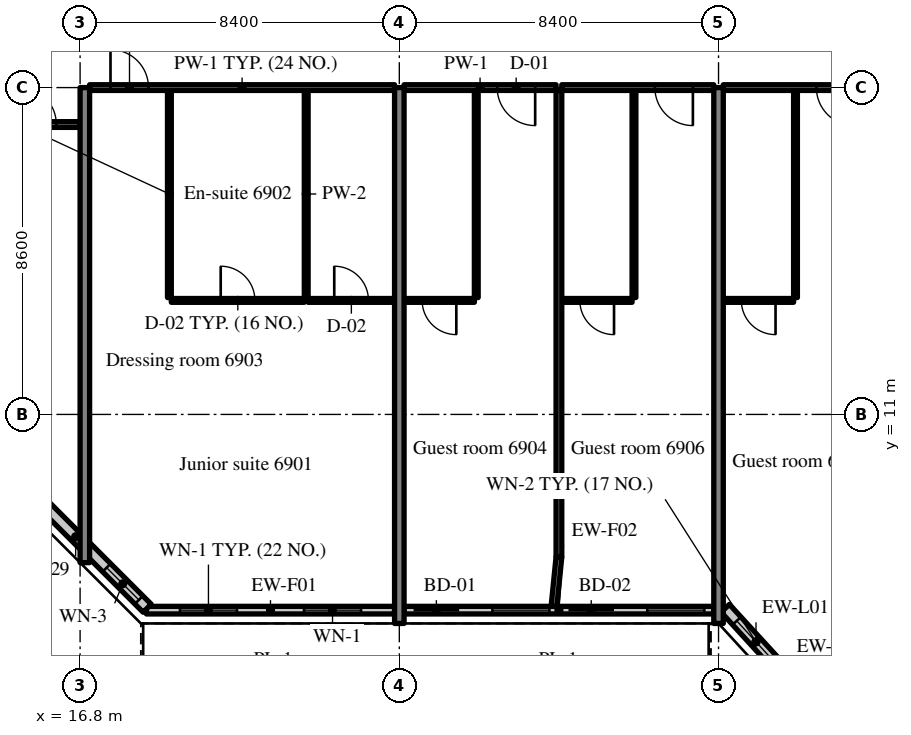
"""IFC4 building model, lengths in metres.
Left out: names, types, materials, properties, quantities, classifications, styles, units other than length and angle.
Written with IfcOpenShell. Run it as: python <this file> out.ifc"""

import sys

from ifc_helpers import new_model, si_unit, direction, frame, frame_2d, origin, place, context, subcontext, project, spatial, rectangle, extrude, source, transform, mapped, element, fill, save


model = new_model("IFC4")
c1 = context("Model", 3, precision=1e-05, world=origin(), true_north=direction((0.0, 1.0)))
c2 = subcontext(c1, "Body", "Model", "MODEL_VIEW")
j1 = project(units=[si_unit("LENGTHUNIT", "METRE"), si_unit("PLANEANGLEUNIT", "RADIAN")], contexts=[c1])
p1 = place(None, origin())
s1 = spatial("IfcSite", under=j1, at=p1, CompositionType="ELEMENT")
p2 = place(p1, origin())
s2 = spatial("IfcBuilding", under=s1, at=p2, CompositionType="ELEMENT")
p3 = place(p2, frame((0.0, 0.0, 289.7)))
s3 = spatial("IfcBuildingStorey", under=s2, at=p3, CompositionType="ELEMENT", Elevation=289.7)
m1 = source(origin(), c2, "Body", "SweptSolid", [
    extrude(rectangle(XDim=12.5, YDim=0.25, at=frame_2d((6.25, 0.0))), origin(), (0.0, 0.0, 1.0), 3.72),
])
p4 = place(p3, frame((16.925, 7.1, 0.0), z_axis=(0.0, 0.0, 1.0), x_axis=(0.0, 1.0, 0.0)))
e1 = element("IfcWall", 1, at=p4, inside=s3, PredefinedType="SHEAR", context=c2, shape_type="MappedRepresentation", body=[
    mapped(m1, transform((0.0, 0.0, 0.0), scale=1.0)),
])
m2 = source(origin(), c2, "Body", "SweptSolid", [
    extrude(rectangle(XDim=14.1, YDim=0.25, at=frame_2d((7.05, 0.0))), origin(), (0.0, 0.0, 1.0), 3.72),
])
for number, where, z_axis, x_axis in (
    (2, (25.2, 5.5, 0.0), (0.0, 0.0, 1.0), (0.0, 1.0, 0.0)),
    (3, (33.6, 5.5, 0.0), (0.0, 0.0, 1.0), (0.0, 1.0, 0.0)),
):
    element("IfcWall", number, at=place(p3, frame(where, z_axis=z_axis, x_axis=x_axis)), inside=s3, PredefinedType="SHEAR", context=c2, shape_type="MappedRepresentation", body=[
        mapped(m2, transform((0.0, 0.0, 0.0), scale=1.0)),
    ])
m3 = source(origin(), c2, "Body", "SweptSolid", [
    extrude(rectangle(XDim=6.53, YDim=0.2, at=frame_2d((3.265, 0.0))), origin(), (0.0, 0.0, 1.0), 3.17),
])
p5 = place(p3, frame((18.545, 5.85, 0.0), z_axis=(0.0, 0.0, 1.0), x_axis=(1.0, 0.0, 0.0)))
e4 = element("IfcWall", 4, at=p5, inside=s3, PredefinedType="SOLIDWALL", context=c2, shape_type="MappedRepresentation", body=[
    mapped(m3, transform((0.0, 0.0, 0.0), scale=1.0)),
])
m4 = source(origin(), c2, "Body", "SweptSolid", [
    extrude(rectangle(XDim=1.5, YDim=1.5, at=frame_2d((0.75, 0.75))), frame((0.0, 0.11, 0.0), z_axis=(0.0, -1.0, 0.0), x_axis=(1.0, 0.0, 0.0)), (0.0, 0.0, 1.0), 0.22),
])
p6 = place(p5, frame((0.883, 0.0, 0.9)))
e5 = element("IfcOpeningElement", 5, at=p6, cuts=e4, PredefinedType="OPENING", context=c2, shape_type="MappedRepresentation", body=[
    mapped(m4, transform((0.0, 0.0, 0.0), scale=1.0)),
])
p7 = place(p5, frame((4.147, 0.0, 0.9)))
e6 = element("IfcOpeningElement", 6, at=p7, cuts=e4, PredefinedType="OPENING", context=c2, shape_type="MappedRepresentation", body=[
    mapped(m4, transform((0.0, 0.0, 0.0), scale=1.0)),
])
m5 = source(origin(), c2, "Body", "SweptSolid", [
    extrude(rectangle(XDim=8.15, YDim=0.2, at=frame_2d((4.075, 0.0))), origin(), (0.0, 0.0, 1.0), 3.17),
])
p8 = place(p3, frame((25.325, 5.85, 0.0), z_axis=(0.0, 0.0, 1.0), x_axis=(1.0, 0.0, 0.0)))
e7 = element("IfcWall", 7, at=p8, inside=s3, PredefinedType="SOLIDWALL", context=c2, shape_type="MappedRepresentation", body=[
    mapped(m5, transform((0.0, 0.0, 0.0), scale=1.0)),
])
m6 = source(origin(), c2, "Body", "SweptSolid", [
    extrude(rectangle(XDim=1.2, YDim=2.4, at=frame_2d((0.6, 1.2))), frame((0.0, 0.11, 0.0), z_axis=(0.0, -1.0, 0.0), x_axis=(1.0, 0.0, 0.0)), (0.0, 0.0, 1.0), 0.22),
])
p9 = place(p8, frame((0.25, 0.0, 0.0)))
e8 = element("IfcOpeningElement", 8, at=p9, cuts=e7, PredefinedType="OPENING", context=c2, shape_type="MappedRepresentation", body=[
    mapped(m6, transform((0.0, 0.0, 0.0), scale=1.0)),
])
p10 = place(p8, frame((2.325, 0.0, 0.9)))
e9 = element("IfcOpeningElement", 9, at=p10, cuts=e7, PredefinedType="OPENING", context=c2, shape_type="MappedRepresentation", body=[
    mapped(m4, transform((0.0, 0.0, 0.0), scale=1.0)),
])
p11 = place(p8, frame((4.325, 0.0, 0.0)))
e10 = element("IfcOpeningElement", 10, at=p11, cuts=e7, PredefinedType="OPENING", context=c2, shape_type="MappedRepresentation", body=[
    mapped(m6, transform((0.0, 0.0, 0.0), scale=1.0)),
])
p12 = place(p8, frame((6.4, 0.0, 0.9)))
e11 = element("IfcOpeningElement", 11, at=p12, cuts=e7, PredefinedType="OPENING", context=c2, shape_type="MappedRepresentation", body=[
    mapped(m4, transform((0.0, 0.0, 0.0), scale=1.0)),
])
m7 = source(origin(), c2, "Body", "SweptSolid", [
    extrude(rectangle(XDim=2.398, YDim=0.3, at=frame_2d((1.199, 0.0))), origin(), (0.0, 0.0, 1.0), 3.72),
])
p13 = place(p3, frame((33.776, 5.9, 0.0), z_axis=(0.0, 0.0, 1.0), x_axis=(0.675374189419, -0.737475222815, 0.0)))
e12 = element("IfcWall", 12, at=p13, inside=s3, PredefinedType="SOLIDWALL", context=c2, shape_type="MappedRepresentation", body=[
    mapped(m7, transform((0.0, 0.0, 0.0), scale=1.0)),
])
m8 = source(origin(), c2, "Body", "SweptSolid", [
    extrude(rectangle(XDim=1.5, YDim=2.0, at=frame_2d((0.75, 1.0))), frame((0.0, 0.16, 0.0), z_axis=(0.0, -1.0, 0.0), x_axis=(1.0, 0.0, 0.0)), (0.0, 0.0, 1.0), 0.32),
])
p14 = place(p13, frame((0.449, 0.0, 0.9)))
e13 = element("IfcOpeningElement", 13, at=p14, cuts=e12, PredefinedType="OPENING", context=c2, shape_type="MappedRepresentation", body=[
    mapped(m8, transform((0.0, 0.0, 0.0), scale=1.0)),
])
m9 = source(origin(), c2, "Body", "SweptSolid", [
    extrude(rectangle(XDim=5.326, YDim=0.3, at=frame_2d((2.663, 0.0))), origin(), (0.0, 0.0, 1.0), 3.72),
])
p15 = place(p3, frame((14.8, 9.666, 0.0), z_axis=(0.0, 0.0, 1.0), x_axis=(0.707083859269, -0.707129702361, 0.0)))
e14 = element("IfcWall", 14, at=p15, inside=s3, PredefinedType="SOLIDWALL", context=c2, shape_type="MappedRepresentation", body=[
    mapped(m9, transform((0.0, 0.0, 0.0), scale=1.0)),
])
m10 = source(origin(), c2, "Body", "SweptSolid", [
    extrude(rectangle(XDim=1.2, YDim=1.5, at=frame_2d((0.6, 0.75))), frame((0.0, 0.16, 0.0), z_axis=(0.0, -1.0, 0.0), x_axis=(1.0, 0.0, 0.0)), (0.0, 0.0, 1.0), 0.32),
])
p16 = place(p15, frame((3.815, 0.0, 0.9)))
e15 = element("IfcOpeningElement", 15, at=p16, cuts=e14, PredefinedType="OPENING", context=c2, shape_type="MappedRepresentation", body=[
    mapped(m10, transform((0.0, 0.0, 0.0), scale=1.0)),
])
m11 = source(origin(), c2, "Body", "SweptSolid", [
    extrude(rectangle(XDim=5.45, YDim=0.1, at=frame_2d((2.725, 0.0))), origin(), (0.0, 0.0, 1.0), 3.72),
])
for number, where, z_axis, x_axis in (
    (16, (19.15, 14.075, 0.0), (0.0, 0.0, 1.0), (0.0, 1.0, 0.0)),
    (17, (22.75, 14.075, 0.0), (0.0, 0.0, 1.0), (0.0, 1.0, 0.0)),
):
    element("IfcWall", number, at=place(p3, frame(where, z_axis=z_axis, x_axis=x_axis)), inside=s3, PredefinedType="PARTITIONING", context=c2, shape_type="MappedRepresentation", body=[
        mapped(m11, transform((0.0, 0.0, 0.0), scale=1.0)),
    ])
m12 = source(origin(), c2, "Body", "SweptSolid", [
    extrude(rectangle(XDim=3.5, YDim=0.1, at=frame_2d((1.75, 0.0))), origin(), (0.0, 0.0, 1.0), 3.72),
])
p17 = place(p3, frame((19.2, 14.0, 0.0), z_axis=(0.0, 0.0, 1.0), x_axis=(1.0, 0.0, 0.0)))
e18 = element("IfcWall", 18, at=p17, inside=s3, PredefinedType="PARTITIONING", context=c2, shape_type="MappedRepresentation", body=[
    mapped(m12, transform((0.0, 0.0, 0.0), scale=1.0)),
])
m13 = source(origin(), c2, "Body", "SweptSolid", [
    extrude(rectangle(XDim=0.9, YDim=2.1, at=frame_2d((0.45, 1.05))), frame((0.0, 0.06, 0.0), z_axis=(0.0, -1.0, 0.0), x_axis=(1.0, 0.0, 0.0)), (0.0, 0.0, 1.0), 0.12),
])
p18 = place(p17, frame((1.3, 0.0, 0.0)))
e19 = element("IfcOpeningElement", 19, at=p18, cuts=e18, PredefinedType="OPENING", context=c2, shape_type="MappedRepresentation", body=[
    mapped(m13, transform((0.0, 0.0, 0.0), scale=1.0)),
])
m14 = source(origin(), c2, "Body", "SweptSolid", [
    extrude(rectangle(XDim=2.275, YDim=0.1, at=frame_2d((1.137, 0.0))), origin(), (0.0, 0.0, 1.0), 3.72),
])
p19 = place(p3, frame((22.8, 14.0, 0.0), z_axis=(0.0, 0.0, 1.0), x_axis=(1.0, 0.0, 0.0)))
e20 = element("IfcWall", 20, at=p19, inside=s3, PredefinedType="PARTITIONING", context=c2, shape_type="MappedRepresentation", body=[
    mapped(m14, transform((0.0, 0.0, 0.0), scale=1.0)),
])
p20 = place(p19, frame((0.688, 0.0, 0.0)))
e21 = element("IfcOpeningElement", 21, at=p20, cuts=e20, PredefinedType="OPENING", context=c2, shape_type="MappedRepresentation", body=[
    mapped(m13, transform((0.0, 0.0, 0.0), scale=1.0)),
])
m15 = source(origin(), c2, "Body", "SweptSolid", [
    extrude(rectangle(XDim=8.025, YDim=0.15, at=frame_2d((4.012, 0.0))), origin(), (0.0, 0.0, 1.0), 3.02),
])
p21 = place(p3, frame((17.05, 19.6, 0.0), z_axis=(0.0, 0.0, 1.0), x_axis=(1.0, 0.0, 0.0)))
e22 = element("IfcWall", 22, at=p21, inside=s3, PredefinedType="PARTITIONING", context=c2, shape_type="MappedRepresentation", body=[
    mapped(m15, transform((0.0, 0.0, 0.0), scale=1.0)),
])
m16 = source(origin(), c2, "Body", "SweptSolid", [
    extrude(rectangle(XDim=1.0, YDim=2.1, at=frame_2d((0.5, 1.05))), frame((0.0, 0.085, 0.0), z_axis=(0.0, -1.0, 0.0), x_axis=(1.0, 0.0, 0.0)), (0.0, 0.0, 1.0), 0.17),
])
p22 = place(p21, frame((0.55, 0.0, 0.0)))
e23 = element("IfcOpeningElement", 23, at=p22, cuts=e22, PredefinedType="OPENING", context=c2, shape_type="MappedRepresentation", body=[
    mapped(m16, transform((0.0, 0.0, 0.0), scale=1.0)),
])
p23 = place(p3, frame((27.225, 14.075, 0.0), z_axis=(0.0, 0.0, 1.0), x_axis=(0.0, 1.0, 0.0)))
e24 = element("IfcWall", 24, at=p23, inside=s3, PredefinedType="PARTITIONING", context=c2, shape_type="MappedRepresentation", body=[
    mapped(m11, transform((0.0, 0.0, 0.0), scale=1.0)),
])
m17 = source(origin(), c2, "Body", "SweptSolid", [
    extrude(rectangle(XDim=1.85, YDim=0.1, at=frame_2d((0.925, 0.0))), origin(), (0.0, 0.0, 1.0), 3.72),
])
p24 = place(p3, frame((25.325, 14.0, 0.0), z_axis=(0.0, 0.0, 1.0), x_axis=(1.0, 0.0, 0.0)))
e25 = element("IfcWall", 25, at=p24, inside=s3, PredefinedType="PARTITIONING", context=c2, shape_type="MappedRepresentation", body=[
    mapped(m17, transform((0.0, 0.0, 0.0), scale=1.0)),
])
p25 = place(p24, frame((0.475, 0.0, 0.0)))
e26 = element("IfcOpeningElement", 26, at=p25, cuts=e25, PredefinedType="OPENING", context=c2, shape_type="MappedRepresentation", body=[
    mapped(m13, transform((0.0, 0.0, 0.0), scale=1.0)),
])
m18 = source(origin(), c2, "Body", "SweptSolid", [
    extrude(rectangle(XDim=4.0, YDim=0.15, at=frame_2d((2.0, 0.0))), origin(), (0.0, 0.0, 1.0), 3.02),
])
p26 = place(p3, frame((25.325, 19.6, 0.0), z_axis=(0.0, 0.0, 1.0), x_axis=(1.0, 0.0, 0.0)))
e27 = element("IfcWall", 27, at=p26, inside=s3, PredefinedType="PARTITIONING", context=c2, shape_type="MappedRepresentation", body=[
    mapped(m18, transform((0.0, 0.0, 0.0), scale=1.0)),
])
p27 = place(p26, frame((2.45, 0.0, 0.0)))
e28 = element("IfcOpeningElement", 28, at=p27, cuts=e27, PredefinedType="OPENING", context=c2, shape_type="MappedRepresentation", body=[
    mapped(m16, transform((0.0, 0.0, 0.0), scale=1.0)),
])
p28 = place(p3, frame((31.375, 14.075, 0.0), z_axis=(0.0, 0.0, 1.0), x_axis=(0.0, 1.0, 0.0)))
e29 = element("IfcWall", 29, at=p28, inside=s3, PredefinedType="PARTITIONING", context=c2, shape_type="MappedRepresentation", body=[
    mapped(m11, transform((0.0, 0.0, 0.0), scale=1.0)),
])
m19 = source(origin(), c2, "Body", "SweptSolid", [
    extrude(rectangle(XDim=1.85, YDim=0.1, at=frame_2d((0.925, 0.0))), origin(), (0.0, 0.0, 1.0), 3.72),
])
p29 = place(p3, frame((29.475, 14.0, 0.0), z_axis=(0.0, 0.0, 1.0), x_axis=(1.0, 0.0, 0.0)))
e30 = element("IfcWall", 30, at=p29, inside=s3, PredefinedType="PARTITIONING", context=c2, shape_type="MappedRepresentation", body=[
    mapped(m19, transform((0.0, 0.0, 0.0), scale=1.0)),
])
p30 = place(p29, frame((0.475, 0.0, 0.0)))
e31 = element("IfcOpeningElement", 31, at=p30, cuts=e30, PredefinedType="OPENING", context=c2, shape_type="MappedRepresentation", body=[
    mapped(m13, transform((0.0, 0.0, 0.0), scale=1.0)),
])
p31 = place(p3, frame((29.475, 19.6, 0.0), z_axis=(0.0, 0.0, 1.0), x_axis=(1.0, 0.0, 0.0)))
e32 = element("IfcWall", 32, at=p31, inside=s3, PredefinedType="PARTITIONING", context=c2, shape_type="MappedRepresentation", body=[
    mapped(m18, transform((0.0, 0.0, 0.0), scale=1.0)),
])
p32 = place(p31, frame((2.45, 0.0, 0.0)))
e33 = element("IfcOpeningElement", 33, at=p32, cuts=e32, PredefinedType="OPENING", context=c2, shape_type="MappedRepresentation", body=[
    mapped(m16, transform((0.0, 0.0, 0.0), scale=1.0)),
])
m20 = source(origin(), c2, "Body", "SweptSolid", [
    extrude(rectangle(XDim=12.275, YDim=0.15, at=frame_2d((6.137, 0.0))), origin(), (0.0, 0.0, 1.0), 3.72),
])
p33 = place(p3, frame((29.4, 7.25, 0.0), z_axis=(0.0, 0.0, 1.0), x_axis=(0.0, 1.0, 0.0)))
e34 = element("IfcWall", 34, at=p33, inside=s3, PredefinedType="PARTITIONING", context=c2, shape_type="MappedRepresentation", body=[
    mapped(m20, transform((0.0, 0.0, 0.0), scale=1.0)),
])
p34 = place(p3, frame((35.625, 14.075, 0.0), z_axis=(0.0, 0.0, 1.0), x_axis=(0.0, 1.0, 0.0)))
e35 = element("IfcWall", 35, at=p34, inside=s3, PredefinedType="PARTITIONING", context=c2, shape_type="MappedRepresentation", body=[
    mapped(m11, transform((0.0, 0.0, 0.0), scale=1.0)),
])
p35 = place(p3, frame((33.725, 14.0, 0.0), z_axis=(0.0, 0.0, 1.0), x_axis=(1.0, 0.0, 0.0)))
e36 = element("IfcWall", 36, at=p35, inside=s3, PredefinedType="PARTITIONING", context=c2, shape_type="MappedRepresentation", body=[
    mapped(m19, transform((0.0, 0.0, 0.0), scale=1.0)),
])
p36 = place(p35, frame((0.475, 0.0, 0.0)))
e37 = element("IfcOpeningElement", 37, at=p36, cuts=e36, PredefinedType="OPENING", context=c2, shape_type="MappedRepresentation", body=[
    mapped(m13, transform((0.0, 0.0, 0.0), scale=1.0)),
])
p37 = place(p3, frame((33.725, 19.6, 0.0), z_axis=(0.0, 0.0, 1.0), x_axis=(1.0, 0.0, 0.0)))
e38 = element("IfcWall", 38, at=p37, inside=s3, PredefinedType="PARTITIONING", context=c2, shape_type="MappedRepresentation", body=[
    mapped(m18, transform((0.0, 0.0, 0.0), scale=1.0)),
])
p38 = place(p37, frame((2.45, 0.0, 0.0)))
e39 = element("IfcOpeningElement", 39, at=p38, cuts=e38, PredefinedType="OPENING", context=c2, shape_type="MappedRepresentation", body=[
    mapped(m16, transform((0.0, 0.0, 0.0), scale=1.0)),
])
m21 = source(origin(), c2, "Body", "SweptSolid", [
    extrude(rectangle(XDim=1.9, YDim=0.15, at=frame_2d((0.95, 0.0))), origin(), (0.0, 0.0, 1.0), 3.02),
])
p39 = place(p3, frame((14.9, 18.628, 0.0), z_axis=(0.0, 0.0, 1.0), x_axis=(1.0, 0.0, 0.0)))
e40 = element("IfcWall", 40, at=p39, inside=s3, PredefinedType="PARTITIONING", context=c2, shape_type="MappedRepresentation", body=[
    mapped(m21, transform((0.0, 0.0, 0.0), scale=1.0)),
])
p40 = place(p39, frame((0.275, 0.0, 0.0)))
e41 = element("IfcOpeningElement", 41, at=p40, cuts=e40, PredefinedType="OPENING", context=c2, shape_type="MappedRepresentation", body=[
    mapped(m16, transform((0.0, 0.0, 0.0), scale=1.0)),
])
m22 = source(origin(), c2, "Body", "SweptSolid", [
    extrude(rectangle(XDim=1.307, YDim=0.15, at=frame_2d((0.653, 0.0))), origin(), (0.0, 0.0, 1.0), 3.72),
])
p41 = place(p3, frame((29.27, 5.95, 0.0), z_axis=(0.0, 0.0, 1.0), x_axis=(0.099411212066, 0.995046436562, 0.0)))
e42 = element("IfcWall", 42, at=p41, inside=s3, PredefinedType="PARTITIONING", context=c2, shape_type="MappedRepresentation", body=[
    mapped(m22, transform((0.0, 0.0, 0.0), scale=1.0)),
])
m23 = source(origin(), c2, "Body", "SweptSolid", [
    extrude(rectangle(XDim=1.5, YDim=1.5, at=frame_2d((0.75, 0.75))), frame((0.0, 0.03, 0.0), z_axis=(0.0, -1.0, 0.0), x_axis=(1.0, 0.0, 0.0)), (0.0, 0.0, 1.0), 0.06),
])
p42 = place(p6, origin())
e43 = element("IfcWindow", 43, at=p42, inside=s3, PartitioningType="SINGLE_PANEL", PredefinedType="WINDOW", context=c2, shape_type="MappedRepresentation", body=[
    mapped(m23, transform((0.0, 0.0, 0.0), scale=1.0)),
])
fill(e5, e43)
p43 = place(p7, origin())
e44 = element("IfcWindow", 44, at=p43, inside=s3, PartitioningType="SINGLE_PANEL", PredefinedType="WINDOW", context=c2, shape_type="MappedRepresentation", body=[
    mapped(m23, transform((0.0, 0.0, 0.0), scale=1.0)),
])
fill(e6, e44)
m24 = source(origin(), c2, "Body", "SweptSolid", [
    extrude(rectangle(XDim=1.2, YDim=2.4, at=frame_2d((0.6, 1.2))), frame((0.0, 0.025, 0.0), z_axis=(0.0, -1.0, 0.0), x_axis=(1.0, 0.0, 0.0)), (0.0, 0.0, 1.0), 0.05),
])
p44 = place(p9, origin())
e45 = element("IfcDoor", 45, at=p44, inside=s3, OperationType="SLIDING_TO_LEFT", PredefinedType="DOOR", context=c2, shape_type="MappedRepresentation", body=[
    mapped(m24, transform((0.0, 0.0, 0.0), scale=1.0)),
])
fill(e8, e45)
p45 = place(p10, origin())
e46 = element("IfcWindow", 46, at=p45, inside=s3, PartitioningType="SINGLE_PANEL", PredefinedType="WINDOW", context=c2, shape_type="MappedRepresentation", body=[
    mapped(m23, transform((0.0, 0.0, 0.0), scale=1.0)),
])
fill(e9, e46)
p46 = place(p11, origin())
e47 = element("IfcDoor", 47, at=p46, inside=s3, OperationType="SLIDING_TO_RIGHT", PredefinedType="DOOR", context=c2, shape_type="MappedRepresentation", body=[
    mapped(m24, transform((0.0, 0.0, 0.0), scale=1.0)),
])
fill(e10, e47)
p47 = place(p12, origin())
e48 = element("IfcWindow", 48, at=p47, inside=s3, PartitioningType="SINGLE_PANEL", PredefinedType="WINDOW", context=c2, shape_type="MappedRepresentation", body=[
    mapped(m23, transform((0.0, 0.0, 0.0), scale=1.0)),
])
fill(e11, e48)
m25 = source(origin(), c2, "Body", "SweptSolid", [
    extrude(rectangle(XDim=1.5, YDim=2.0, at=frame_2d((0.75, 1.0))), frame((0.0, 0.03, 0.0), z_axis=(0.0, -1.0, 0.0), x_axis=(1.0, 0.0, 0.0)), (0.0, 0.0, 1.0), 0.06),
])
p48 = place(p14, origin())
e49 = element("IfcWindow", 49, at=p48, inside=s3, PartitioningType="SINGLE_PANEL", PredefinedType="WINDOW", context=c2, shape_type="MappedRepresentation", body=[
    mapped(m25, transform((0.0, 0.0, 0.0), scale=1.0)),
])
fill(e13, e49)
m26 = source(origin(), c2, "Body", "SweptSolid", [
    extrude(rectangle(XDim=1.2, YDim=1.5, at=frame_2d((0.6, 0.75))), frame((0.0, 0.03, 0.0), z_axis=(0.0, -1.0, 0.0), x_axis=(1.0, 0.0, 0.0)), (0.0, 0.0, 1.0), 0.06),
])
p49 = place(p16, origin())
e50 = element("IfcWindow", 50, at=p49, inside=s3, PartitioningType="SINGLE_PANEL", PredefinedType="WINDOW", context=c2, shape_type="MappedRepresentation", body=[
    mapped(m26, transform((0.0, 0.0, 0.0), scale=1.0)),
])
fill(e15, e50)
m27 = source(origin(), c2, "Body", "SweptSolid", [
    extrude(rectangle(XDim=0.9, YDim=2.1, at=frame_2d((0.45, 1.05))), frame((0.0, 0.025, 0.0), z_axis=(0.0, -1.0, 0.0), x_axis=(1.0, 0.0, 0.0)), (0.0, 0.0, 1.0), 0.05),
])
p50 = place(p18, origin())
e51 = element("IfcDoor", 51, at=p50, inside=s3, OperationType="SINGLE_SWING_LEFT", PredefinedType="DOOR", context=c2, shape_type="MappedRepresentation", body=[
    mapped(m27, transform((0.0, 0.0, 0.0), scale=1.0)),
])
fill(e19, e51)
p51 = place(p20, origin())
e52 = element("IfcDoor", 52, at=p51, inside=s3, OperationType="SINGLE_SWING_LEFT", PredefinedType="DOOR", context=c2, shape_type="MappedRepresentation", body=[
    mapped(m27, transform((0.0, 0.0, 0.0), scale=1.0)),
])
fill(e21, e52)
m28 = source(origin(), c2, "Body", "SweptSolid", [
    extrude(rectangle(XDim=1.0, YDim=2.1, at=frame_2d((0.5, 1.05))), frame((0.0, 0.025, 0.0), z_axis=(0.0, -1.0, 0.0), x_axis=(1.0, 0.0, 0.0)), (0.0, 0.0, 1.0), 0.05),
])
p52 = place(p22, origin())
e53 = element("IfcDoor", 53, at=p52, inside=s3, OperationType="SINGLE_SWING_LEFT", PredefinedType="DOOR", context=c2, shape_type="MappedRepresentation", body=[
    mapped(m28, transform((0.0, 0.0, 0.0), scale=1.0)),
])
fill(e23, e53)
p53 = place(p25, origin())
e54 = element("IfcDoor", 54, at=p53, inside=s3, OperationType="SINGLE_SWING_RIGHT", PredefinedType="DOOR", context=c2, shape_type="MappedRepresentation", body=[
    mapped(m27, transform((0.0, 0.0, 0.0), scale=1.0)),
])
fill(e26, e54)
p54 = place(p27, origin())
e55 = element("IfcDoor", 55, at=p54, inside=s3, OperationType="SINGLE_SWING_RIGHT", PredefinedType="DOOR", context=c2, shape_type="MappedRepresentation", body=[
    mapped(m28, transform((0.0, 0.0, 0.0), scale=1.0)),
])
fill(e28, e55)
p55 = place(p30, origin())
e56 = element("IfcDoor", 56, at=p55, inside=s3, OperationType="SINGLE_SWING_RIGHT", PredefinedType="DOOR", context=c2, shape_type="MappedRepresentation", body=[
    mapped(m27, transform((0.0, 0.0, 0.0), scale=1.0)),
])
fill(e31, e56)
p56 = place(p32, origin())
e57 = element("IfcDoor", 57, at=p56, inside=s3, OperationType="SINGLE_SWING_RIGHT", PredefinedType="DOOR", context=c2, shape_type="MappedRepresentation", body=[
    mapped(m28, transform((0.0, 0.0, 0.0), scale=1.0)),
])
fill(e33, e57)
p57 = place(p36, origin())
e58 = element("IfcDoor", 58, at=p57, inside=s3, OperationType="SINGLE_SWING_RIGHT", PredefinedType="DOOR", context=c2, shape_type="MappedRepresentation", body=[
    mapped(m27, transform((0.0, 0.0, 0.0), scale=1.0)),
])
fill(e37, e58)
p58 = place(p38, origin())
e59 = element("IfcDoor", 59, at=p58, inside=s3, OperationType="SINGLE_SWING_RIGHT", PredefinedType="DOOR", context=c2, shape_type="MappedRepresentation", body=[
    mapped(m28, transform((0.0, 0.0, 0.0), scale=1.0)),
])
fill(e39, e59)
p59 = place(p40, origin())
e60 = element("IfcDoor", 60, at=p59, inside=s3, OperationType="SINGLE_SWING_LEFT", PredefinedType="DOOR", context=c2, shape_type="MappedRepresentation", body=[
    mapped(m28, transform((0.0, 0.0, 0.0), scale=1.0)),
])
fill(e41, e60)
save(model, sys.argv[1])
